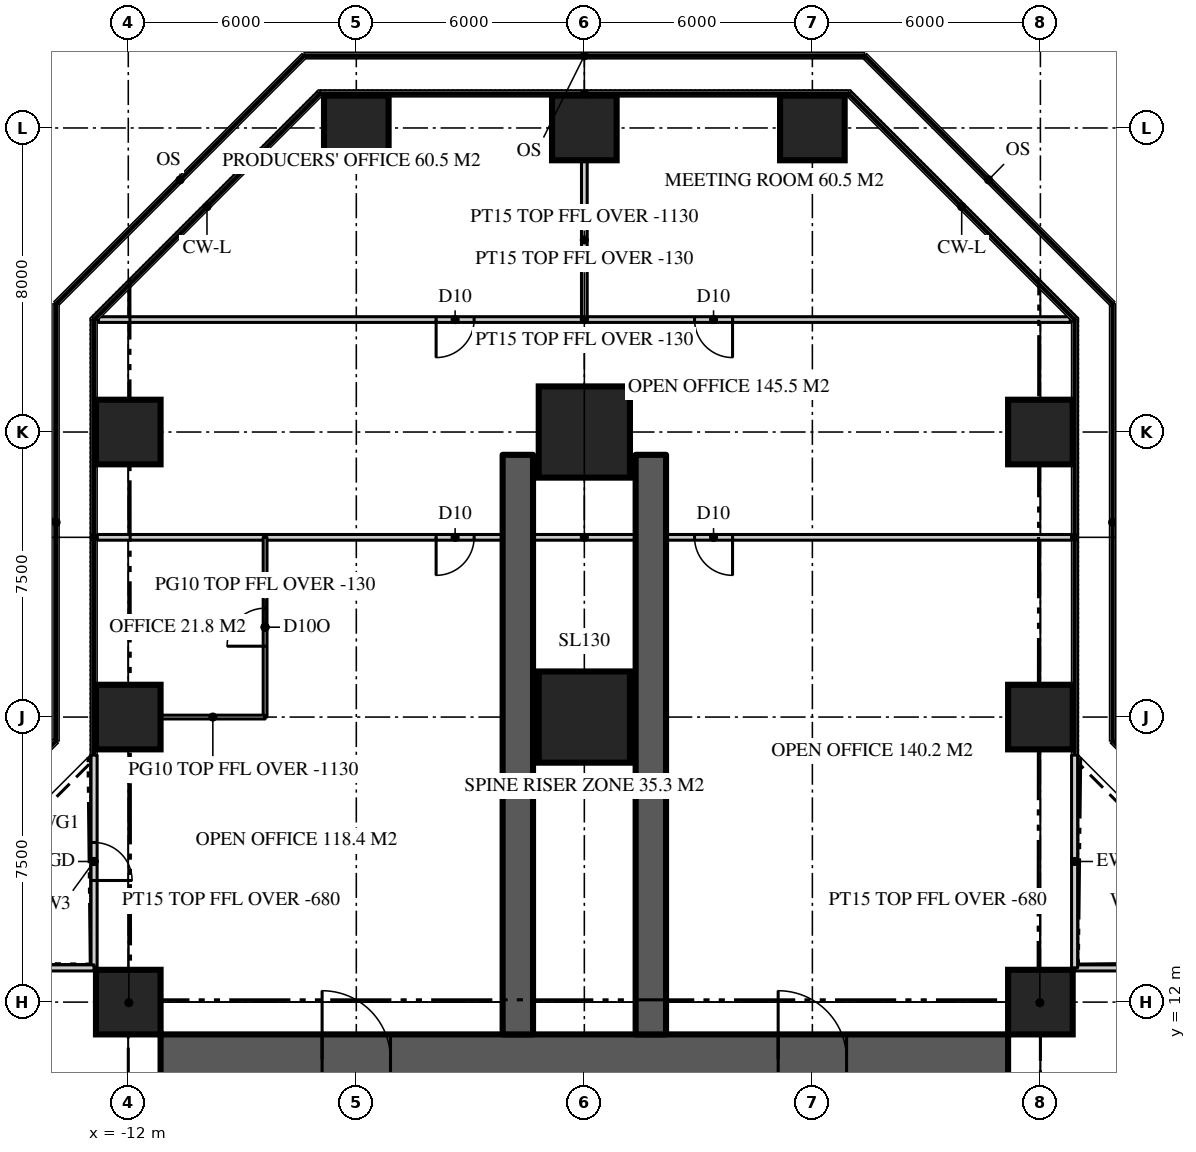
"""IFC4 building model, lengths in metres.
Left out: names, types, materials, properties, quantities, classifications, styles, units other than length and angle.
Written with IfcOpenShell. Run it as: python <this file> out.ifc"""

import sys

from ifc_helpers import new_model, si_unit, direction, frame, frame_2d, origin, origin_2d, place, context, subcontext, project, spatial, rectangle, extrude, element, fill, save


model = new_model("IFC4")
c1 = context("Model", 3, precision=1e-05, world=origin(), true_north=direction((0.0, 1.0)))
c2 = subcontext(c1, "Body", "Model", "MODEL_VIEW")
j1 = project(units=[si_unit("LENGTHUNIT", "METRE"), si_unit("PLANEANGLEUNIT", "RADIAN")], contexts=[c1])
p1 = place(None, origin())
s1 = spatial("IfcSite", under=j1, at=p1, CompositionType="ELEMENT")
p2 = place(p1, origin())
s2 = spatial("IfcBuilding", under=s1, at=p2, CompositionType="ELEMENT")
p3 = place(p2, frame((0.0, 0.0, 47.4)))
s3 = spatial("IfcBuildingStorey", under=s2, at=p3, CompositionType="ELEMENT", Elevation=47.4)
p4 = place(p3, frame((-11.15, 10.5, 0.0), z_axis=(0.0, 0.0, 1.0), x_axis=(1.0, 0.0, 0.0)))
e1 = element("IfcWall", 1, at=p4, inside=s3, PredefinedType="SHEAR", context=c2, shape_type="SweptSolid", body=[
    extrude(rectangle(XDim=22.3, YDim=1.3, at=frame_2d((11.15, 0.0))), origin(), (0.0, 0.0, 1.0), 3.9),
])
p5 = place(p4, frame((4.25, 0.0, 0.0)))
e2 = element("IfcOpeningElement", 2, at=p5, cuts=e1, PredefinedType="OPENING", context=c2, shape_type="SweptSolid", body=[
    extrude(rectangle(XDim=1.8, YDim=2.2, at=frame_2d((0.9, 1.1))), frame((0.0, 0.66, 0.0), z_axis=(0.0, -1.0, 0.0), x_axis=(1.0, 0.0, 0.0)), (0.0, 0.0, 1.0), 1.32),
])
p6 = place(p4, frame((16.25, 0.0, 0.0)))
e3 = element("IfcOpeningElement", 3, at=p6, cuts=e1, PredefinedType="OPENING", context=c2, shape_type="SweptSolid", body=[
    extrude(rectangle(XDim=1.8, YDim=2.2, at=frame_2d((0.9, 1.1))), frame((0.0, 0.66, 0.0), z_axis=(0.0, -1.0, 0.0), x_axis=(1.0, 0.0, 0.0)), (0.0, 0.0, 1.0), 1.32),
])
for number, where, z_axis, x_axis in (
    (4, (1.75, 11.15, 0.0), (0.0, 0.0, 1.0), (0.0, 1.0, 0.0)),
    (5, (-1.75, 11.15, 0.0), (0.0, 0.0, 1.0), (0.0, 1.0, 0.0)),
):
    element("IfcWall", number, at=place(p3, frame(where, z_axis=z_axis, x_axis=x_axis)), inside=s3, PredefinedType="SHEAR", context=c2, shape_type="SweptSolid", body=[
        extrude(rectangle(XDim=15.25, YDim=0.8, at=frame_2d((7.625, 0.0))), origin(), (0.0, 0.0, 1.0), 3.9),
    ])
for number, where, z_axis, x_axis in (
    (6, (-12.0, 12.0, 0.0), (0.0, 0.0, 1.0), (1.0, 0.0, 0.0)),
    (7, (12.0, 12.0, 0.0), (0.0, 0.0, 1.0), (1.0, 0.0, 0.0)),
    (8, (-12.0, 19.5, 0.0), (0.0, 0.0, 1.0), (1.0, 0.0, 0.0)),
):
    element("IfcColumn", number, at=place(p3, frame(where, z_axis=z_axis, x_axis=x_axis)), inside=s3, PredefinedType="COLUMN", context=c2, shape_type="SweptSolid", body=[
        extrude(rectangle(XDim=1.7, YDim=1.7, at=origin_2d()), origin(), (0.0, 0.0, 1.0), 3.9),
    ])
p7 = place(p3, frame((0.0, 19.5, 0.0), z_axis=(0.0, 0.0, 1.0), x_axis=(1.0, 0.0, 0.0)))
e9 = element("IfcColumn", 9, at=p7, inside=s3, PredefinedType="COLUMN", context=c2, shape_type="SweptSolid", body=[
    extrude(rectangle(XDim=2.4, YDim=2.4, at=origin_2d()), origin(), (0.0, 0.0, 1.0), 3.9),
])
for number, where, z_axis, x_axis in (
    (10, (12.0, 19.5, 0.0), (0.0, 0.0, 1.0), (1.0, 0.0, 0.0)),
    (11, (-12.0, 27.0, 0.0), (0.0, 0.0, 1.0), (1.0, 0.0, 0.0)),
):
    element("IfcColumn", number, at=place(p3, frame(where, z_axis=z_axis, x_axis=x_axis)), inside=s3, PredefinedType="COLUMN", context=c2, shape_type="SweptSolid", body=[
        extrude(rectangle(XDim=1.7, YDim=1.7, at=origin_2d()), origin(), (0.0, 0.0, 1.0), 3.9),
    ])
p8 = place(p3, frame((0.0, 27.0, 0.0), z_axis=(0.0, 0.0, 1.0), x_axis=(1.0, 0.0, 0.0)))
e12 = element("IfcColumn", 12, at=p8, inside=s3, PredefinedType="COLUMN", context=c2, shape_type="SweptSolid", body=[
    extrude(rectangle(XDim=2.4, YDim=2.4, at=origin_2d()), origin(), (0.0, 0.0, 1.0), 3.9),
])
for number, where, z_axis, x_axis in (
    (13, (12.0, 27.0, 0.0), (0.0, 0.0, 1.0), (1.0, 0.0, 0.0)),
    (14, (-6.0, 35.0, 0.0), (0.0, 0.0, 1.0), (1.0, 0.0, 0.0)),
    (15, (0.0, 35.0, 0.0), (0.0, 0.0, 1.0), (1.0, 0.0, 0.0)),
    (16, (6.0, 35.0, 0.0), (0.0, 0.0, 1.0), (1.0, 0.0, 0.0)),
):
    element("IfcColumn", number, at=place(p3, frame(where, z_axis=z_axis, x_axis=x_axis)), inside=s3, PredefinedType="COLUMN", context=c2, shape_type="SweptSolid", body=[
        extrude(rectangle(XDim=1.7, YDim=1.7, at=origin_2d()), origin(), (0.0, 0.0, 1.0), 3.9),
    ])
p9 = place(p3, frame((18.5, 12.9, 0.0), z_axis=(0.0, 0.0, 1.0), x_axis=(-1.0, 0.0, 0.0)))
e17 = element("IfcWall", 17, at=p9, inside=s3, PredefinedType="SOLIDWALL", context=c2, shape_type="SweptSolid", body=[
    extrude(rectangle(XDim=5.6, YDim=0.16, at=frame_2d((2.8, 0.0))), origin(), (0.0, 0.0, 1.0), 3.77),
])
p10 = place(p9, frame((2.3, 0.0, 0.0)))
e18 = element("IfcOpeningElement", 18, at=p10, cuts=e17, PredefinedType="OPENING", context=c2, shape_type="SweptSolid", body=[
    extrude(rectangle(XDim=1.0, YDim=2.2, at=frame_2d((0.5, 1.1))), frame((0.0, 0.09, 0.0), z_axis=(0.0, -1.0, 0.0), x_axis=(1.0, 0.0, 0.0)), (0.0, 0.0, 1.0), 0.18),
])
p11 = place(p3, frame((12.9, 12.9, 0.0), z_axis=(0.0, 0.0, 1.0), x_axis=(0.0, 1.0, 0.0)))
e19 = element("IfcWall", 19, at=p11, inside=s3, PredefinedType="SOLIDWALL", context=c2, shape_type="SweptSolid", body=[
    extrude(rectangle(XDim=5.6, YDim=0.16, at=frame_2d((2.8, 0.0))), origin(), (0.0, 0.0, 1.0), 3.77),
])
p12 = place(p3, frame((-12.9, 18.5, 0.0), z_axis=(0.0, 0.0, 1.0), x_axis=(0.0, -1.0, 0.0)))
e20 = element("IfcWall", 20, at=p12, inside=s3, PredefinedType="SOLIDWALL", context=c2, shape_type="SweptSolid", body=[
    extrude(rectangle(XDim=5.6, YDim=0.16, at=frame_2d((2.8, 0.0))), origin(), (0.0, 0.0, 1.0), 3.77),
])
p13 = place(p12, frame((2.3, 0.0, 0.0)))
e21 = element("IfcOpeningElement", 21, at=p13, cuts=e20, PredefinedType="OPENING", context=c2, shape_type="SweptSolid", body=[
    extrude(rectangle(XDim=1.0, YDim=2.2, at=frame_2d((0.5, 1.1))), frame((0.0, 0.09, 0.0), z_axis=(0.0, -1.0, 0.0), x_axis=(1.0, 0.0, 0.0)), (0.0, 0.0, 1.0), 0.18),
])
p14 = place(p3, frame((-12.9, 12.9, 0.0), z_axis=(0.0, 0.0, 1.0), x_axis=(-1.0, 0.0, 0.0)))
e22 = element("IfcWall", 22, at=p14, inside=s3, PredefinedType="SOLIDWALL", context=c2, shape_type="SweptSolid", body=[
    extrude(rectangle(XDim=5.6, YDim=0.16, at=frame_2d((2.8, 0.0))), origin(), (0.0, 0.0, 1.0), 3.77),
])
p15 = place(p3, frame((12.82, 24.229, 0.0), z_axis=(0.0, 0.0, 1.0), x_axis=(-1.0, 0.0, 0.0)))
e23 = element("IfcWall", 23, at=p15, inside=s3, PredefinedType="PARTITIONING", context=c2, shape_type="SweptSolid", body=[
    extrude(rectangle(XDim=25.64, YDim=0.15, at=frame_2d((12.82, 0.0))), origin(), (0.0, 0.0, 1.0), 3.77),
])
p16 = place(p15, frame((15.72, 0.0, 0.0)))
e24 = element("IfcOpeningElement", 24, at=p16, cuts=e23, PredefinedType="OPENING", context=c2, shape_type="SweptSolid", body=[
    extrude(rectangle(XDim=1.0, YDim=2.2, at=frame_2d((0.5, 1.1))), frame((0.0, 0.085, 0.0), z_axis=(0.0, -1.0, 0.0), x_axis=(1.0, 0.0, 0.0)), (0.0, 0.0, 1.0), 0.17),
])
p17 = place(p15, frame((8.92, 0.0, 0.0)))
e25 = element("IfcOpeningElement", 25, at=p17, cuts=e23, PredefinedType="OPENING", context=c2, shape_type="SweptSolid", body=[
    extrude(rectangle(XDim=1.0, YDim=2.2, at=frame_2d((0.5, 1.1))), frame((0.0, 0.085, 0.0), z_axis=(0.0, -1.0, 0.0), x_axis=(1.0, 0.0, 0.0)), (0.0, 0.0, 1.0), 0.17),
])
p18 = place(p3, frame((12.786, 29.959, 0.0), z_axis=(0.0, 0.0, 1.0), x_axis=(-1.0, 0.0, 0.0)))
e26 = element("IfcWall", 26, at=p18, inside=s3, PredefinedType="PARTITIONING", context=c2, shape_type="SweptSolid", body=[
    extrude(rectangle(XDim=25.573, YDim=0.15, at=frame_2d((12.786, 0.0))), origin(), (0.0, 0.0, 1.0), 3.77),
])
p19 = place(p18, frame((15.687, 0.0, 0.0)))
e27 = element("IfcOpeningElement", 27, at=p19, cuts=e26, PredefinedType="OPENING", context=c2, shape_type="SweptSolid", body=[
    extrude(rectangle(XDim=1.0, YDim=2.2, at=frame_2d((0.5, 1.1))), frame((0.0, 0.085, 0.0), z_axis=(0.0, -1.0, 0.0), x_axis=(1.0, 0.0, 0.0)), (0.0, 0.0, 1.0), 0.17),
])
p20 = place(p18, frame((8.886, 0.0, 0.0)))
e28 = element("IfcOpeningElement", 28, at=p20, cuts=e26, PredefinedType="OPENING", context=c2, shape_type="SweptSolid", body=[
    extrude(rectangle(XDim=1.0, YDim=2.2, at=frame_2d((0.5, 1.1))), frame((0.0, 0.085, 0.0), z_axis=(0.0, -1.0, 0.0), x_axis=(1.0, 0.0, 0.0)), (0.0, 0.0, 1.0), 0.17),
])
p21 = place(p3, frame((0.0, 29.959, 0.0), z_axis=(0.0, 0.0, 1.0), x_axis=(0.0, 1.0, 0.0)))
e29 = element("IfcWall", 29, at=p21, inside=s3, PredefinedType="PARTITIONING", context=c2, shape_type="SweptSolid", body=[
    extrude(rectangle(XDim=4.191, YDim=0.15, at=frame_2d((2.095, 0.0))), origin(), (0.0, 0.0, 1.0), 2.77),
])
p22 = place(p3, frame((-8.4, 19.5, 0.0), z_axis=(0.0, 0.0, 1.0), x_axis=(0.0, 1.0, 0.0)))
e30 = element("IfcWall", 30, at=p22, inside=s3, PredefinedType="PARTITIONING", context=c2, shape_type="SweptSolid", body=[
    extrude(rectangle(XDim=4.729, YDim=0.1, at=frame_2d((2.365, 0.0))), origin(), (0.0, 0.0, 1.0), 3.77),
])
p23 = place(p22, frame((1.865, 0.0, 0.0)))
e31 = element("IfcOpeningElement", 31, at=p23, cuts=e30, PredefinedType="OPENING", context=c2, shape_type="SweptSolid", body=[
    extrude(rectangle(XDim=1.0, YDim=2.2, at=frame_2d((0.5, 1.1))), frame((0.0, 0.06, 0.0), z_axis=(0.0, -1.0, 0.0), x_axis=(1.0, 0.0, 0.0)), (0.0, 0.0, 1.0), 0.12),
])
p24 = place(p3, frame((-8.4, 19.5, 0.0), z_axis=(0.0, 0.0, 1.0), x_axis=(-1.0, 0.0, 0.0)))
e32 = element("IfcWall", 32, at=p24, inside=s3, PredefinedType="PARTITIONING", context=c2, shape_type="SweptSolid", body=[
    extrude(rectangle(XDim=2.75, YDim=0.1, at=frame_2d((1.375, 0.0))), origin(), (0.0, 0.0, 1.0), 2.77),
])
for number, where, z_axis, x_axis in (
    (33, (11.15, 11.15, 0.0), (0.0, 0.0, 1.0), (0.707, 0.707, 0.0)),
    (34, (-11.15, 11.15, 0.0), (0.0, 0.0, 1.0), (-0.707, 0.707, 0.0)),
):
    element("IfcWall", number, at=place(p3, frame(where, z_axis=z_axis, x_axis=x_axis)), inside=s3, PredefinedType="PARTITIONING", context=c2, shape_type="SweptSolid", body=[
        extrude(rectangle(XDim=2.362, YDim=0.15, at=frame_2d((1.181, 0.0))), origin(), (0.0, 0.0, 1.0), 3.22),
    ])
p25 = place(p13, origin())
e35 = element("IfcDoor", 35, at=p25, inside=s3, OperationType="SINGLE_SWING_RIGHT", PredefinedType="DOOR", context=c2, shape_type="SweptSolid", body=[
    extrude(rectangle(XDim=1.0, YDim=2.2, at=frame_2d((0.5, 1.1))), frame((0.0, 0.025, 0.0), z_axis=(0.0, -1.0, 0.0), x_axis=(1.0, 0.0, 0.0)), (0.0, 0.0, 1.0), 0.05),
])
fill(e21, e35)
p26 = place(p5, origin())
e36 = element("IfcDoor", 36, at=p26, inside=s3, OperationType="DOUBLE_DOOR_DOUBLE_SWING", PredefinedType="DOOR", context=c2, shape_type="SweptSolid", body=[
    extrude(rectangle(XDim=1.8, YDim=2.2, at=frame_2d((0.9, 1.1))), frame((0.0, 0.025, 0.0), z_axis=(0.0, -1.0, 0.0), x_axis=(1.0, 0.0, 0.0)), (0.0, 0.0, 1.0), 0.05),
])
fill(e2, e36)
p27 = place(p6, origin())
e37 = element("IfcDoor", 37, at=p27, inside=s3, OperationType="DOUBLE_DOOR_DOUBLE_SWING", PredefinedType="DOOR", context=c2, shape_type="SweptSolid", body=[
    extrude(rectangle(XDim=1.8, YDim=2.2, at=frame_2d((0.9, 1.1))), frame((0.0, 0.025, 0.0), z_axis=(0.0, -1.0, 0.0), x_axis=(1.0, 0.0, 0.0)), (0.0, 0.0, 1.0), 0.05),
])
fill(e3, e37)
p28 = place(p16, origin())
e38 = element("IfcDoor", 38, at=p28, inside=s3, OperationType="SINGLE_SWING_RIGHT", PredefinedType="DOOR", context=c2, shape_type="SweptSolid", body=[
    extrude(rectangle(XDim=1.0, YDim=2.2, at=frame_2d((0.5, 1.1))), frame((0.0, 0.025, 0.0), z_axis=(0.0, -1.0, 0.0), x_axis=(1.0, 0.0, 0.0)), (0.0, 0.0, 1.0), 0.05),
])
fill(e24, e38)
p29 = place(p17, origin())
e39 = element("IfcDoor", 39, at=p29, inside=s3, OperationType="SINGLE_SWING_LEFT", PredefinedType="DOOR", context=c2, shape_type="SweptSolid", body=[
    extrude(rectangle(XDim=1.0, YDim=2.2, at=frame_2d((0.5, 1.1))), frame((0.0, 0.025, 0.0), z_axis=(0.0, -1.0, 0.0), x_axis=(1.0, 0.0, 0.0)), (0.0, 0.0, 1.0), 0.05),
])
fill(e25, e39)
p30 = place(p19, origin())
e40 = element("IfcDoor", 40, at=p30, inside=s3, OperationType="SINGLE_SWING_RIGHT", PredefinedType="DOOR", context=c2, shape_type="SweptSolid", body=[
    extrude(rectangle(XDim=1.0, YDim=2.2, at=frame_2d((0.5, 1.1))), frame((0.0, 0.025, 0.0), z_axis=(0.0, -1.0, 0.0), x_axis=(1.0, 0.0, 0.0)), (0.0, 0.0, 1.0), 0.05),
])
fill(e27, e40)
p31 = place(p20, origin())
e41 = element("IfcDoor", 41, at=p31, inside=s3, OperationType="SINGLE_SWING_LEFT", PredefinedType="DOOR", context=c2, shape_type="SweptSolid", body=[
    extrude(rectangle(XDim=1.0, YDim=2.2, at=frame_2d((0.5, 1.1))), frame((0.0, 0.025, 0.0), z_axis=(0.0, -1.0, 0.0), x_axis=(1.0, 0.0, 0.0)), (0.0, 0.0, 1.0), 0.05),
])
fill(e28, e41)
p32 = place(p23, origin())
e42 = element("IfcDoor", 42, at=p32, inside=s3, OperationType="SINGLE_SWING_LEFT", PredefinedType="DOOR", context=c2, shape_type="SweptSolid", body=[
    extrude(rectangle(XDim=1.0, YDim=2.2, at=frame_2d((0.5, 1.1))), frame((0.0, 0.025, 0.0), z_axis=(0.0, -1.0, 0.0), x_axis=(1.0, 0.0, 0.0)), (0.0, 0.0, 1.0), 0.05),
])
fill(e31, e42)
save(model, sys.argv[1])
